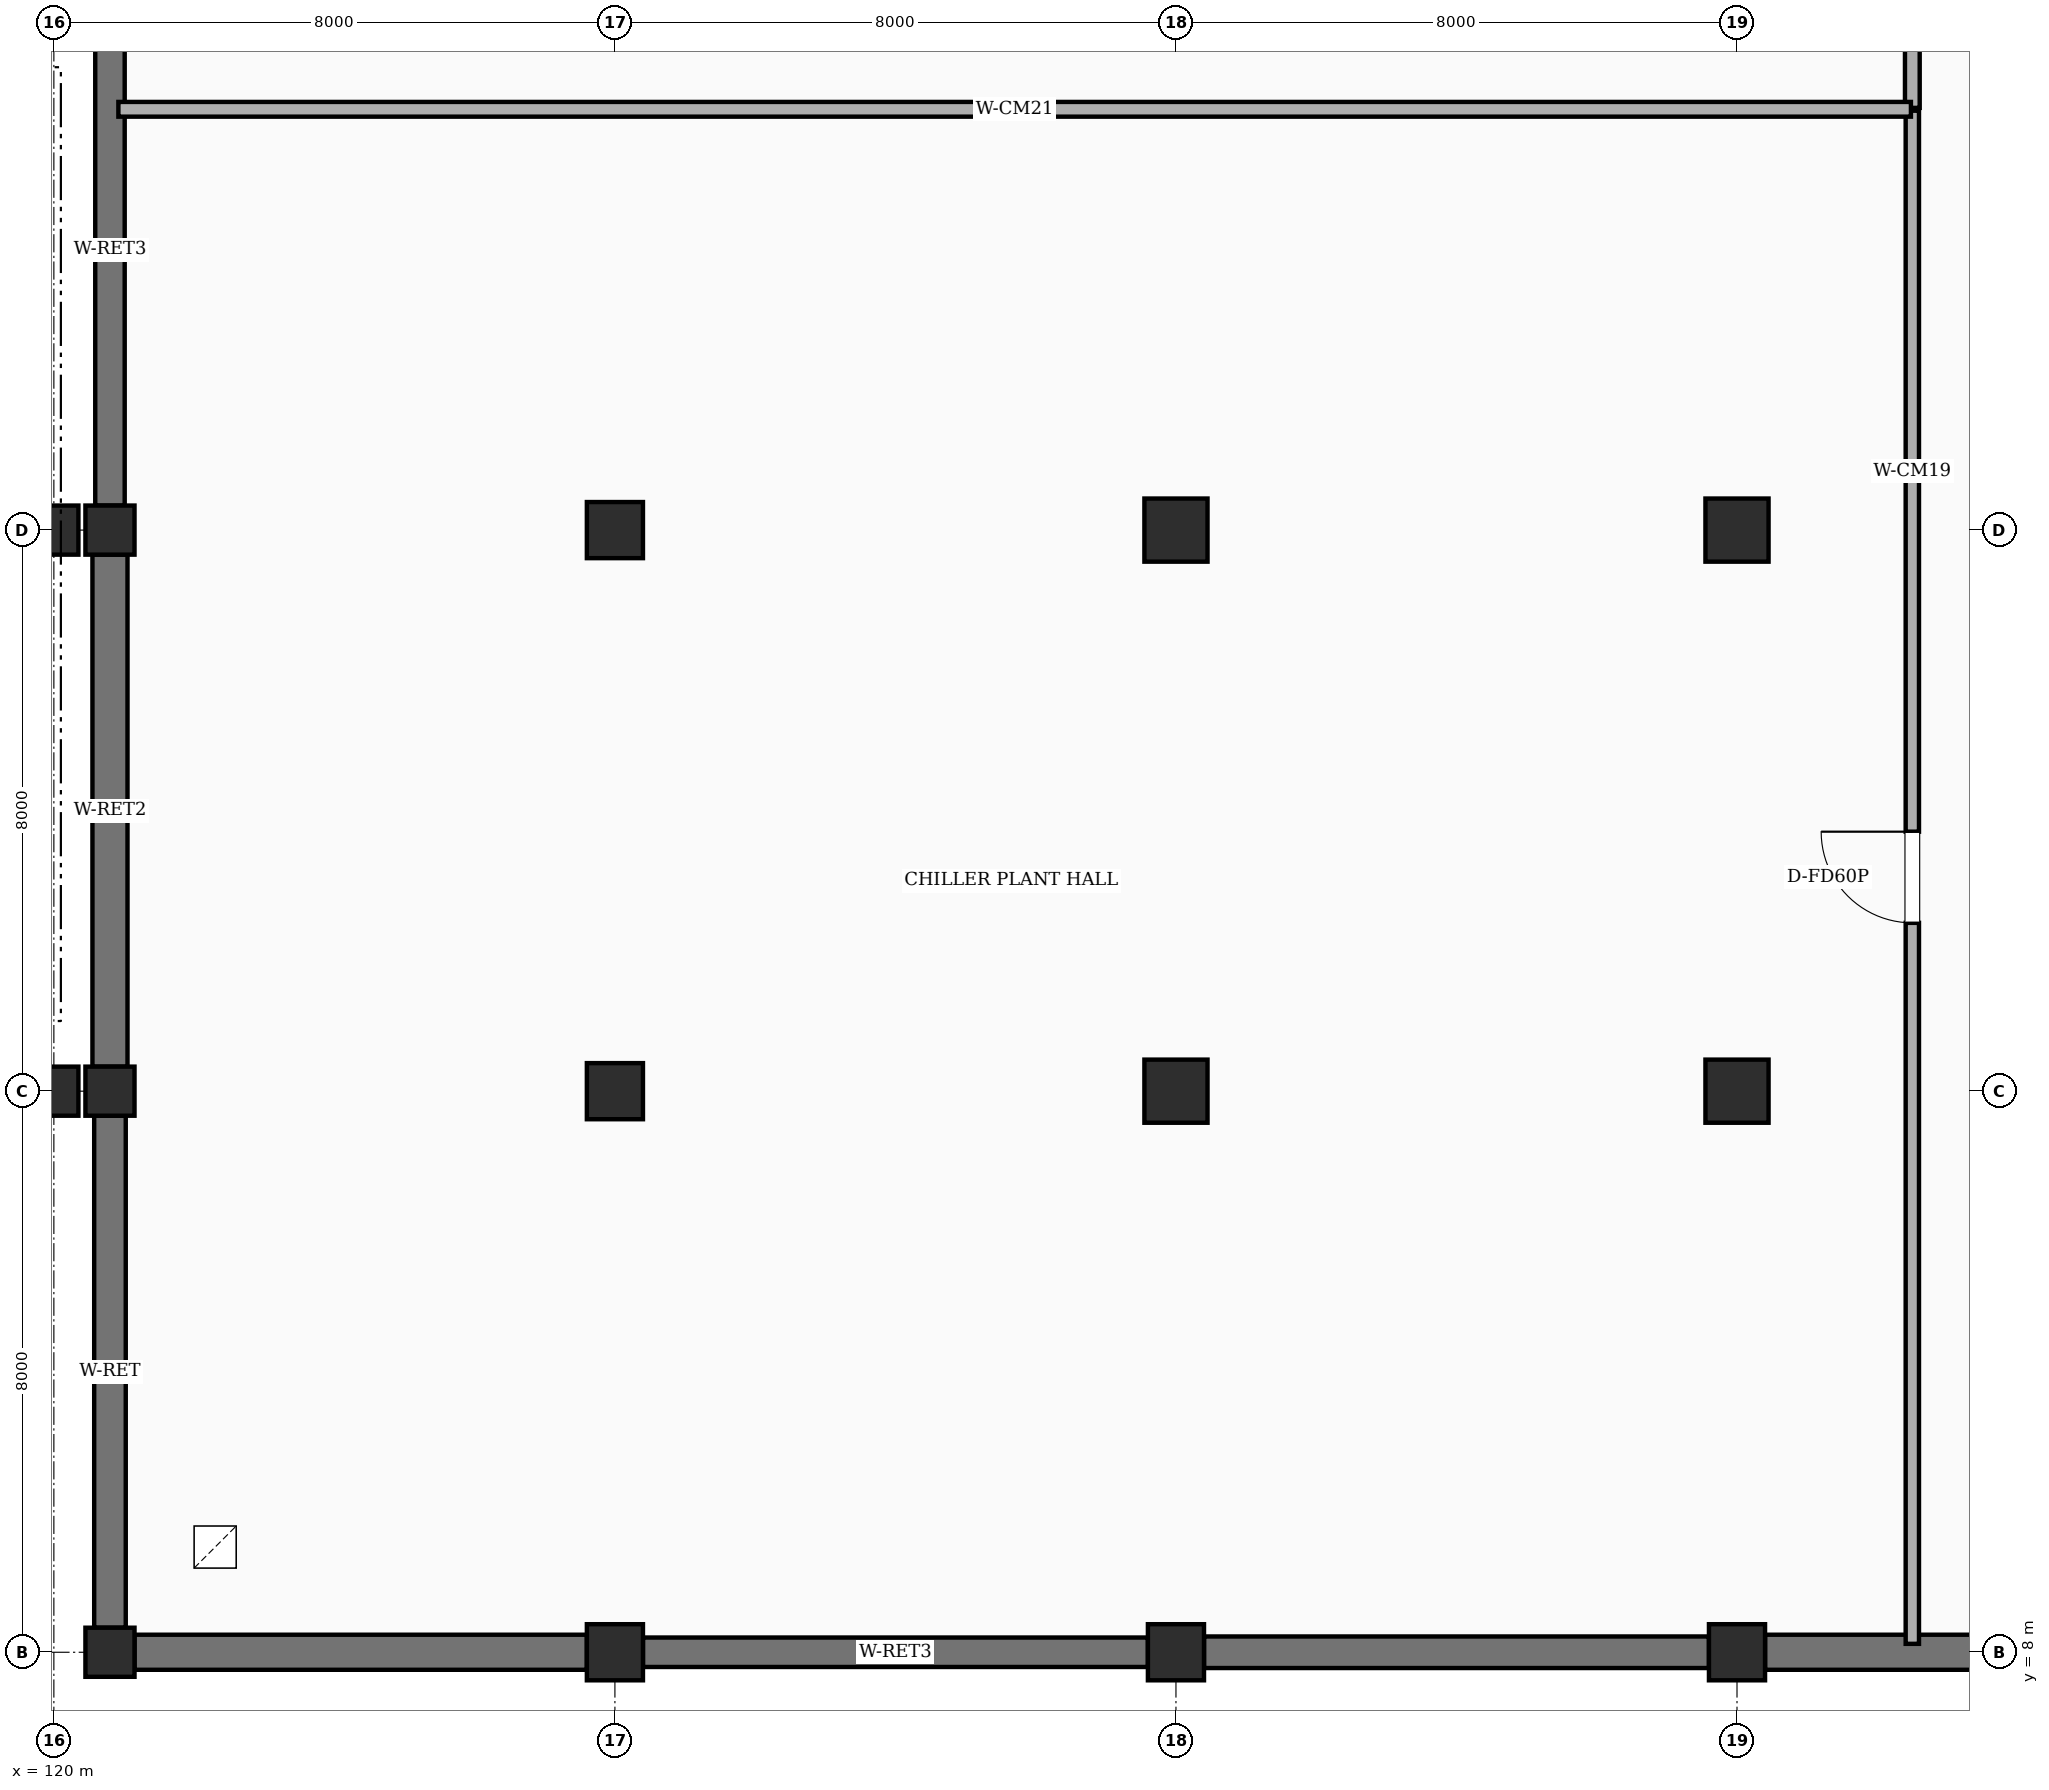
"""IFC4 building model, lengths in metres.
Left out: names, types, materials, properties, quantities, classifications, styles, units other than length and angle.
Written with IfcOpenShell. Run it as: python <this file> out.ifc"""

import sys

from ifc_helpers import new_model, si_unit, direction, frame, frame_2d, origin, origin_2d, place, context, subcontext, project, spatial, rectangle, extrude, element, fill, save


model = new_model("IFC4")
c1 = context("Model", 3, precision=1e-05, world=origin(), true_north=direction((0.0, 1.0)))
c2 = subcontext(c1, "Body", "Model", "MODEL_VIEW")
j1 = project(units=[si_unit("LENGTHUNIT", "METRE"), si_unit("PLANEANGLEUNIT", "RADIAN")], contexts=[c1])
p1 = place(None, origin())
s1 = spatial("IfcSite", under=j1, at=p1, CompositionType="ELEMENT")
p2 = place(p1, origin())
s2 = spatial("IfcBuilding", under=s1, at=p2, CompositionType="ELEMENT")
p3 = place(p2, frame((0.0, 0.0, -5.4)))
s3 = spatial("IfcBuildingStorey", under=s2, at=p3, CompositionType="ELEMENT", Elevation=-5.4)
for number, where, z_axis, x_axis in (
    (1, (120.0, 16.0, -0.4), (0.0, 0.0, 1.0), (1.0, 0.0, 0.0)),
    (2, (120.0, 24.0, -0.4), (0.0, 0.0, 1.0), (1.0, 0.0, 0.0)),
    (3, (120.8, 8.0, -0.4), (0.0, 0.0, 1.0), (1.0, 0.0, 0.0)),
    (4, (120.8, 16.0, -0.4), (0.0, 0.0, 1.0), (1.0, 0.0, 0.0)),
    (5, (120.8, 24.0, -0.4), (0.0, 0.0, 1.0), (1.0, 0.0, 0.0)),
):
    element("IfcColumn", number, at=place(p3, frame(where, z_axis=z_axis, x_axis=x_axis)), inside=s3, PredefinedType="COLUMN", context=c2, shape_type="SweptSolid", body=[
        extrude(rectangle(XDim=0.7, YDim=0.7, at=origin_2d()), origin(), (0.0, 0.0, 1.0), 5.8),
    ])
for number, where, z_axis, x_axis in (
    (6, (128.0, 8.0, -0.4), (0.0, 0.0, 1.0), (1.0, 0.0, 0.0)),
    (7, (128.0, 16.0, -0.4), (0.0, 0.0, 1.0), (1.0, 0.0, 0.0)),
    (8, (128.0, 24.0, -0.4), (0.0, 0.0, 1.0), (1.0, 0.0, 0.0)),
    (9, (136.0, 8.0, -0.4), (0.0, 0.0, 1.0), (1.0, 0.0, 0.0)),
):
    element("IfcColumn", number, at=place(p3, frame(where, z_axis=z_axis, x_axis=x_axis)), inside=s3, PredefinedType="COLUMN", context=c2, shape_type="SweptSolid", body=[
        extrude(rectangle(XDim=0.8, YDim=0.8, at=origin_2d()), origin(), (0.0, 0.0, 1.0), 5.8),
    ])
for number, where, z_axis, x_axis in (
    (10, (136.0, 16.0, -0.4), (0.0, 0.0, 1.0), (1.0, 0.0, 0.0)),
    (11, (136.0, 24.0, -0.4), (0.0, 0.0, 1.0), (1.0, 0.0, 0.0)),
):
    element("IfcColumn", number, at=place(p3, frame(where, z_axis=z_axis, x_axis=x_axis)), inside=s3, PredefinedType="COLUMN", context=c2, shape_type="SweptSolid", body=[
        extrude(rectangle(XDim=0.9, YDim=0.9, at=origin_2d()), origin(), (0.0, 0.0, 1.0), 5.8),
    ])
p4 = place(p3, frame((144.0, 8.0, -0.4), z_axis=(0.0, 0.0, 1.0), x_axis=(1.0, 0.0, 0.0)))
e12 = element("IfcColumn", 12, at=p4, inside=s3, PredefinedType="COLUMN", context=c2, shape_type="SweptSolid", body=[
    extrude(rectangle(XDim=0.8, YDim=0.8, at=origin_2d()), origin(), (0.0, 0.0, 1.0), 5.8),
])
for number, where, z_axis, x_axis in (
    (13, (144.0, 16.0, -0.4), (0.0, 0.0, 1.0), (1.0, 0.0, 0.0)),
    (14, (144.0, 24.0, -0.4), (0.0, 0.0, 1.0), (1.0, 0.0, 0.0)),
):
    element("IfcColumn", number, at=place(p3, frame(where, z_axis=z_axis, x_axis=x_axis)), inside=s3, PredefinedType="COLUMN", context=c2, shape_type="SweptSolid", body=[
        extrude(rectangle(XDim=0.9, YDim=0.9, at=origin_2d()), origin(), (0.0, 0.0, 1.0), 5.8),
    ])
p5 = place(p3, frame((120.8, 8.35, 0.0), z_axis=(0.0, 0.0, 1.0), x_axis=(0.0, 1.0, 0.0)))
e15 = element("IfcWall", 15, at=p5, inside=s3, PredefinedType="USERDEFINED", context=c2, shape_type="SweptSolid", body=[
    extrude(rectangle(XDim=7.3, YDim=0.45, at=frame_2d((3.65, 0.0))), origin(), (0.0, 0.0, 1.0), 4.4),
])
p6 = place(p3, frame((120.8, 16.35, 0.0), z_axis=(0.0, 0.0, 1.0), x_axis=(0.0, 1.0, 0.0)))
e16 = element("IfcWall", 16, at=p6, inside=s3, PredefinedType="USERDEFINED", context=c2, shape_type="SweptSolid", body=[
    extrude(rectangle(XDim=7.3, YDim=0.5, at=frame_2d((3.65, 0.0))), origin(), (0.0, 0.0, 1.0), 4.4),
])
p7 = place(p3, frame((120.8, 24.35, 0.0), z_axis=(0.0, 0.0, 1.0), x_axis=(0.0, 1.0, 0.0)))
e17 = element("IfcWall", 17, at=p7, inside=s3, PredefinedType="USERDEFINED", context=c2, shape_type="SweptSolid", body=[
    extrude(rectangle(XDim=7.3, YDim=0.42, at=frame_2d((3.65, 0.0))), origin(), (0.0, 0.0, 1.0), 4.4),
])
p8 = place(p3, frame((121.15, 8.0, 0.0), z_axis=(0.0, 0.0, 1.0), x_axis=(1.0, 0.0, 0.0)))
e18 = element("IfcWall", 18, at=p8, inside=s3, PredefinedType="USERDEFINED", context=c2, shape_type="SweptSolid", body=[
    extrude(rectangle(XDim=6.45, YDim=0.5, at=frame_2d((3.225, 0.0))), origin(), (0.0, 0.0, 1.0), 4.4),
])
p9 = place(p3, frame((128.4, 8.0, 0.0), z_axis=(0.0, 0.0, 1.0), x_axis=(1.0, 0.0, 0.0)))
e19 = element("IfcWall", 19, at=p9, inside=s3, PredefinedType="USERDEFINED", context=c2, shape_type="SweptSolid", body=[
    extrude(rectangle(XDim=7.2, YDim=0.42, at=frame_2d((3.6, 0.0))), origin(), (0.0, 0.0, 1.0), 4.4),
])
p10 = place(p3, frame((136.4, 8.0, 0.0), z_axis=(0.0, 0.0, 1.0), x_axis=(1.0, 0.0, 0.0)))
e20 = element("IfcWall", 20, at=p10, inside=s3, PredefinedType="USERDEFINED", context=c2, shape_type="SweptSolid", body=[
    extrude(rectangle(XDim=7.2, YDim=0.45, at=frame_2d((3.6, 0.0))), origin(), (0.0, 0.0, 1.0), 4.4),
])
p11 = place(p3, frame((144.4, 8.0, 0.0), z_axis=(0.0, 0.0, 1.0), x_axis=(1.0, 0.0, 0.0)))
e21 = element("IfcWall", 21, at=p11, inside=s3, PredefinedType="USERDEFINED", context=c2, shape_type="SweptSolid", body=[
    extrude(rectangle(XDim=7.2, YDim=0.5, at=frame_2d((3.6, 0.0))), origin(), (0.0, 0.0, 1.0), 5.0),
])
p12 = place(p3, frame((146.5, 8.12, 0.0), z_axis=(0.0, 0.0, 1.0), x_axis=(0.0, 1.0, 0.0)))
e22 = element("IfcWall", 22, at=p12, inside=s3, PredefinedType="SOLIDWALL", context=c2, shape_type="SweptSolid", body=[
    extrude(rectangle(XDim=21.86, YDim=0.19, at=frame_2d((10.93, 0.0))), origin(), (0.0, 0.0, 1.0), 5.0),
])
p13 = place(p12, frame((10.28, 0.0, 0.0)))
e23 = element("IfcOpeningElement", 23, at=p13, cuts=e22, PredefinedType="OPENING", context=c2, shape_type="SweptSolid", body=[
    extrude(rectangle(XDim=1.3, YDim=2.2, at=frame_2d((0.65, 1.1))), frame((0.0, 0.105, 0.0), z_axis=(0.0, -1.0, 0.0), x_axis=(1.0, 0.0, 0.0)), (0.0, 0.0, 1.0), 0.21),
])
p14 = place(p3, frame((146.5, 30.02, 0.0), z_axis=(0.0, 0.0, 1.0), x_axis=(0.0, 1.0, 0.0)))
e24 = element("IfcWall", 24, at=p14, inside=s3, PredefinedType="SOLIDWALL", context=c2, shape_type="SweptSolid", body=[
    extrude(rectangle(XDim=17.96, YDim=0.21, at=frame_2d((8.98, 0.0))), origin(), (0.0, 0.0, 1.0), 5.0),
])
p15 = place(p14, frame((8.33, 0.0, 0.0)))
e25 = element("IfcOpeningElement", 25, at=p15, cuts=e24, PredefinedType="OPENING", context=c2, shape_type="SweptSolid", body=[
    extrude(rectangle(XDim=1.3, YDim=2.2, at=frame_2d((0.65, 1.1))), frame((0.0, 0.115, 0.0), z_axis=(0.0, -1.0, 0.0), x_axis=(1.0, 0.0, 0.0)), (0.0, 0.0, 1.0), 0.23),
])
p16 = place(p3, frame((120.92, 30.0, 0.0), z_axis=(0.0, 0.0, 1.0), x_axis=(1.0, 0.0, 0.0)))
e26 = element("IfcWall", 26, at=p16, inside=s3, PredefinedType="SOLIDWALL", context=c2, shape_type="SweptSolid", body=[
    extrude(rectangle(XDim=25.56, YDim=0.21, at=frame_2d((12.78, 0.0))), origin(), (0.0, 0.0, 1.0), 4.15),
])
p17 = place(p13, origin())
e27 = element("IfcDoor", 27, at=p17, inside=s3, OperationType="SINGLE_SWING_RIGHT", PredefinedType="DOOR", context=c2, shape_type="SweptSolid", body=[
    extrude(rectangle(XDim=1.3, YDim=2.2, at=frame_2d((0.65, 1.1))), frame((0.0, 0.025, 0.0), z_axis=(0.0, -1.0, 0.0), x_axis=(1.0, 0.0, 0.0)), (0.0, 0.0, 1.0), 0.05),
])
fill(e23, e27)
save(model, sys.argv[1])
